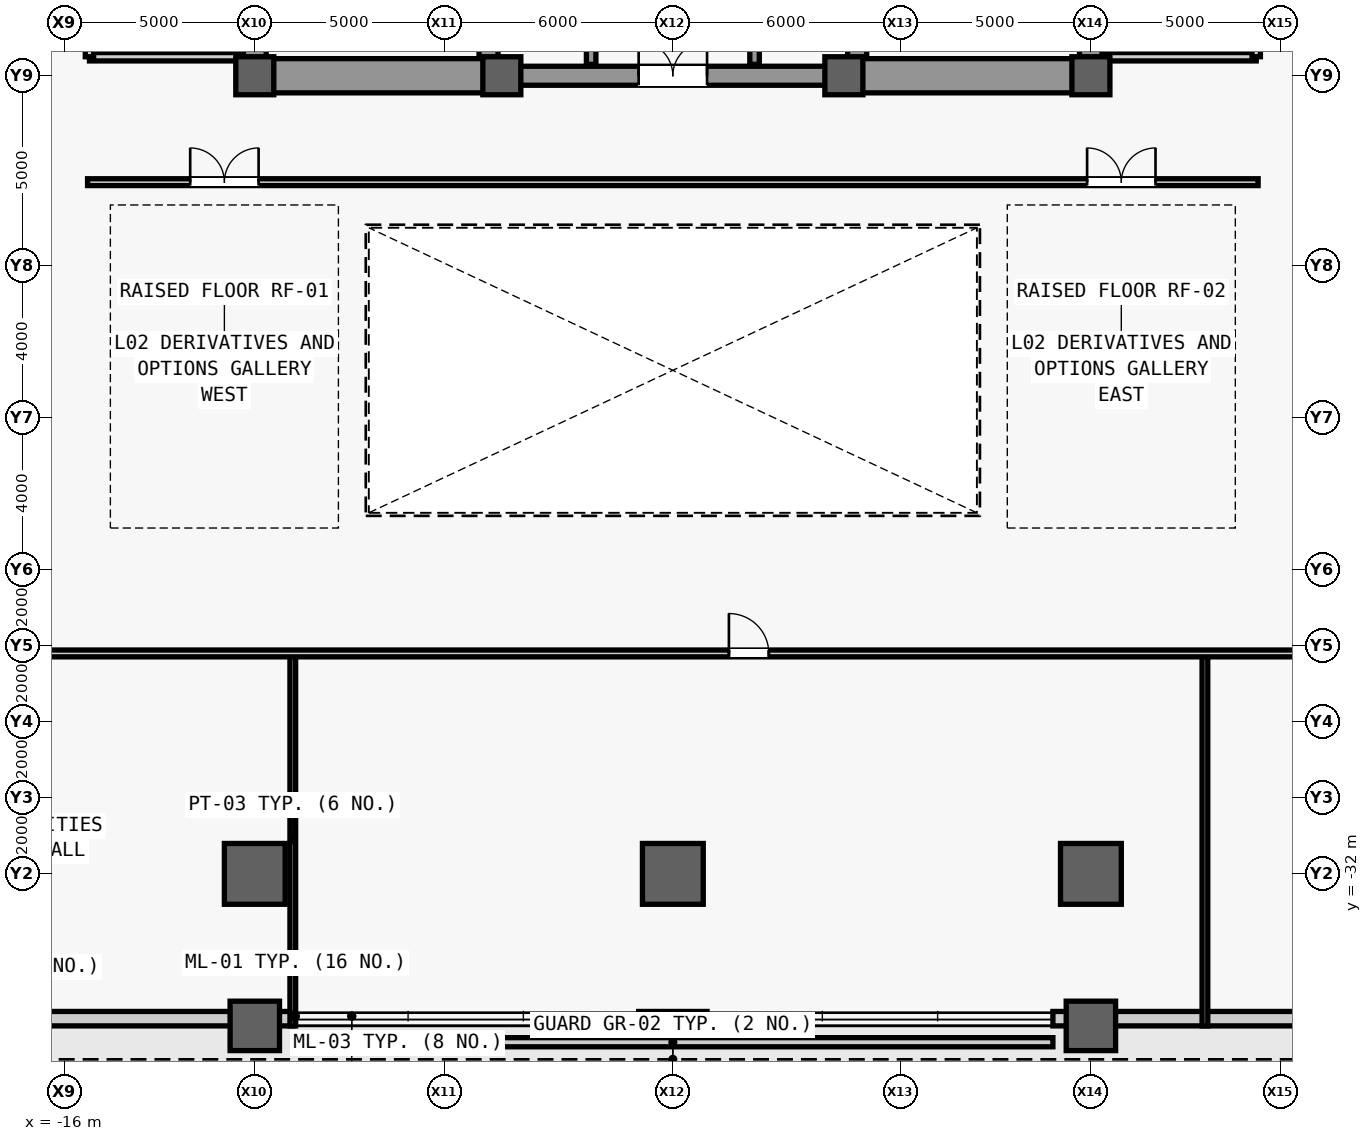
"""IFC4 building model, lengths in metres.
Left out: names, types, materials, properties, quantities, classifications, styles, units other than length and angle.
Written with IfcOpenShell. Run it as: python <this file> out.ifc"""

import sys

from ifc_helpers import new_model, si_unit, direction, frame, frame_2d, origin, origin_2d, place, context, subcontext, project, spatial, rectangle, extrude, source, transform, mapped, element, fill, save


model = new_model("IFC4")
c1 = context("Model", 3, precision=1e-05, world=origin(), true_north=direction((0.0, 1.0)))
c2 = subcontext(c1, "Body", "Model", "MODEL_VIEW")
j1 = project(units=[si_unit("LENGTHUNIT", "METRE"), si_unit("PLANEANGLEUNIT", "RADIAN")], contexts=[c1])
p1 = place(None, origin())
s1 = spatial("IfcSite", under=j1, at=p1, CompositionType="ELEMENT")
p2 = place(p1, origin())
s2 = spatial("IfcBuilding", under=s1, at=p2, CompositionType="ELEMENT")
p3 = place(p2, frame((0.0, 0.0, 12.0)))
s3 = spatial("IfcBuildingStorey", under=s2, at=p3, CompositionType="ELEMENT", Elevation=12.0)
m1 = source(origin(), c2, "Body", "SweptSolid", [
    extrude(rectangle(XDim=22.0, YDim=0.6, at=frame_2d((11.0, 0.0))), origin(), (0.0, 0.0, 1.0), 5.08),
])
p4 = place(p3, frame((-11.0, -11.0, 0.0), z_axis=(0.0, 0.0, 1.0), x_axis=(0.0, 1.0, 0.0)))
e1 = element("IfcWall", 1, at=p4, inside=s3, PredefinedType="SHEAR", context=c2, shape_type="MappedRepresentation", body=[
    mapped(m1, transform((0.0, 0.0, 0.0), scale=1.0)),
])
m2 = source(origin(), c2, "Body", "SweptSolid", [
    extrude(rectangle(XDim=1.1, YDim=2.2, at=frame_2d((0.55, 1.1))), frame((0.0, 0.31, 0.0), z_axis=(0.0, -1.0, 0.0), x_axis=(1.0, 0.0, 0.0)), (0.0, 0.0, 1.0), 0.62),
])
p5 = place(p4, frame((0.8, 0.0, 0.0)))
e2 = element("IfcOpeningElement", 2, at=p5, cuts=e1, PredefinedType="OPENING", context=c2, shape_type="MappedRepresentation", body=[
    mapped(m2, transform((0.0, 0.0, 0.0), scale=1.0)),
])
p6 = place(p4, frame((12.5, 0.0, 0.0)))
e3 = element("IfcOpeningElement", 3, at=p6, cuts=e1, PredefinedType="OPENING", context=c2, shape_type="MappedRepresentation", body=[
    mapped(m2, transform((0.0, 0.0, 0.0), scale=1.0)),
])
m3 = source(origin(), c2, "Body", "SweptSolid", [
    extrude(rectangle(XDim=0.9, YDim=2.15, at=frame_2d((0.45, 1.075))), frame((0.0, 0.31, 0.0), z_axis=(0.0, -1.0, 0.0), x_axis=(1.0, 0.0, 0.0)), (0.0, 0.0, 1.0), 0.62),
])
p7 = place(p4, frame((6.85, 0.0, 0.0)))
e4 = element("IfcOpeningElement", 4, at=p7, cuts=e1, PredefinedType="OPENING", context=c2, shape_type="MappedRepresentation", body=[
    mapped(m3, transform((0.0, 0.0, 0.0), scale=1.0)),
])
m4 = source(origin(), c2, "Body", "SweptSolid", [
    extrude(rectangle(XDim=1.3, YDim=2.3, at=frame_2d((0.65, 1.15))), frame((0.0, 0.31, 0.0), z_axis=(0.0, -1.0, 0.0), x_axis=(1.0, 0.0, 0.0)), (0.0, 0.0, 1.0), 0.62),
])
p8 = place(p4, frame((2.7, 0.0, 0.0)))
e5 = element("IfcOpeningElement", 5, at=p8, cuts=e1, PredefinedType="OPENING", context=c2, shape_type="MappedRepresentation", body=[
    mapped(m4, transform((0.0, 0.0, 0.0), scale=1.0)),
])
p9 = place(p3, frame((11.0, -11.0, 0.0), z_axis=(0.0, 0.0, 1.0), x_axis=(0.0, 1.0, 0.0)))
e6 = element("IfcWall", 6, at=p9, inside=s3, PredefinedType="SHEAR", context=c2, shape_type="MappedRepresentation", body=[
    mapped(m1, transform((0.0, 0.0, 0.0), scale=1.0)),
])
p10 = place(p9, frame((0.8, 0.0, 0.0)))
e7 = element("IfcOpeningElement", 7, at=p10, cuts=e6, PredefinedType="OPENING", context=c2, shape_type="MappedRepresentation", body=[
    mapped(m2, transform((0.0, 0.0, 0.0), scale=1.0)),
])
p11 = place(p9, frame((6.2, 0.0, 0.0)))
e8 = element("IfcOpeningElement", 8, at=p11, cuts=e6, PredefinedType="OPENING", context=c2, shape_type="MappedRepresentation", body=[
    mapped(m3, transform((0.0, 0.0, 0.0), scale=1.0)),
])
p12 = place(p9, frame((8.05, 0.0, 0.0)))
e9 = element("IfcOpeningElement", 9, at=p12, cuts=e6, PredefinedType="OPENING", context=c2, shape_type="MappedRepresentation", body=[
    mapped(m3, transform((0.0, 0.0, 0.0), scale=1.0)),
])
p13 = place(p9, frame((2.7, 0.0, 0.0)))
e10 = element("IfcOpeningElement", 10, at=p13, cuts=e6, PredefinedType="OPENING", context=c2, shape_type="MappedRepresentation", body=[
    mapped(m4, transform((0.0, 0.0, 0.0), scale=1.0)),
])
p14 = place(p9, frame((13.35, 0.0, 0.0)))
e11 = element("IfcOpeningElement", 11, at=p14, cuts=e6, PredefinedType="OPENING", context=c2, shape_type="MappedRepresentation", body=[
    mapped(m4, transform((0.0, 0.0, 0.0), scale=1.0)),
])
m5 = source(origin(), c2, "Body", "SweptSolid", [
    extrude(rectangle(XDim=21.4, YDim=0.5, at=frame_2d((10.7, 0.0))), origin(), (0.0, 0.0, 1.0), 5.08),
])
for number, where, z_axis, x_axis in (
    (12, (-4.85, -10.7, 0.0), (0.0, 0.0, 1.0), (0.0, 1.0, 0.0)),
    (13, (4.85, -10.7, 0.0), (0.0, 0.0, 1.0), (0.0, 1.0, 0.0)),
):
    element("IfcWall", number, at=place(p3, frame(where, z_axis=z_axis, x_axis=x_axis)), inside=s3, PredefinedType="SHEAR", context=c2, shape_type="MappedRepresentation", body=[
        mapped(m5, transform((0.0, 0.0, 0.0), scale=1.0)),
    ])
m6 = source(origin(), c2, "Body", "SweptSolid", [
    extrude(rectangle(XDim=5.85, YDim=0.9, at=frame_2d((2.925, 0.0))), origin(), (0.0, 0.0, 1.0), 5.08),
])
for number, where, z_axis, x_axis in (
    (14, (-10.7, -11.0, 0.0), (0.0, 0.0, 1.0), (1.0, 0.0, 0.0)),
    (15, (4.85, -11.0, 0.0), (0.0, 0.0, 1.0), (1.0, 0.0, 0.0)),
):
    element("IfcWall", number, at=place(p3, frame(where, z_axis=z_axis, x_axis=x_axis)), inside=s3, PredefinedType="SHEAR", context=c2, shape_type="MappedRepresentation", body=[
        mapped(m6, transform((0.0, 0.0, 0.0), scale=1.0)),
    ])
m7 = source(origin(), c2, "Body", "SweptSolid", [
    extrude(rectangle(XDim=9.2, YDim=0.5, at=frame_2d((4.6, 0.0))), origin(), (0.0, 0.0, 1.0), 5.08),
])
p15 = place(p3, frame((-4.6, -11.0, 0.0), z_axis=(0.0, 0.0, 1.0), x_axis=(1.0, 0.0, 0.0)))
e16 = element("IfcWall", 16, at=p15, inside=s3, PredefinedType="SHEAR", context=c2, shape_type="MappedRepresentation", body=[
    mapped(m7, transform((0.0, 0.0, 0.0), scale=1.0)),
])
m8 = source(origin(), c2, "Body", "SweptSolid", [
    extrude(rectangle(XDim=1.8, YDim=2.25, at=frame_2d((0.9, 1.125))), frame((0.0, 0.26, 0.0), z_axis=(0.0, -1.0, 0.0), x_axis=(1.0, 0.0, 0.0)), (0.0, 0.0, 1.0), 0.52),
])
p16 = place(p15, frame((3.7, 0.0, 0.0)))
e17 = element("IfcOpeningElement", 17, at=p16, cuts=e16, PredefinedType="OPENING", context=c2, shape_type="MappedRepresentation", body=[
    mapped(m8, transform((0.0, 0.0, 0.0), scale=1.0)),
])
m9 = source(origin(), c2, "Body", "SweptSolid", [
    extrude(rectangle(XDim=1.3, YDim=1.3, at=origin_2d()), origin(), (0.0, 0.0, 1.0), 5.4),
])
p17 = place(p3, frame((-11.0, -36.0, 0.0), z_axis=(0.0, 0.0, 1.0), x_axis=(1.0, 0.0, 0.0)))
e18 = element("IfcColumn", 18, at=p17, inside=s3, PredefinedType="COLUMN", context=c2, shape_type="MappedRepresentation", body=[
    mapped(m9, transform((0.0, 0.0, 0.0), scale=1.0)),
])
m10 = source(origin(), c2, "Body", "SweptSolid", [
    extrude(rectangle(XDim=1.6, YDim=1.6, at=origin_2d()), origin(), (0.0, 0.0, 1.0), 5.4),
])
p18 = place(p3, frame((-11.0, -32.0, 0.0), z_axis=(0.0, 0.0, 1.0), x_axis=(1.0, 0.0, 0.0)))
e19 = element("IfcColumn", 19, at=p18, inside=s3, PredefinedType="COLUMN", context=c2, shape_type="MappedRepresentation", body=[
    mapped(m10, transform((0.0, 0.0, 0.0), scale=1.0)),
])
m11 = source(origin(), c2, "Body", "SweptSolid", [
    extrude(rectangle(XDim=1.0, YDim=1.0, at=origin_2d()), origin(), (0.0, 0.0, 1.0), 5.4),
])
for number, where, z_axis, x_axis in (
    (20, (-11.0, -11.0, 0.0), (0.0, 0.0, 1.0), (1.0, 0.0, 0.0)),
    (21, (-4.5, -11.0, 0.0), (0.0, 0.0, 1.0), (1.0, 0.0, 0.0)),
):
    element("IfcColumn", number, at=place(p3, frame(where, z_axis=z_axis, x_axis=x_axis)), inside=s3, PredefinedType="COLUMN", context=c2, shape_type="MappedRepresentation", body=[
        mapped(m11, transform((0.0, 0.0, 0.0), scale=1.0)),
    ])
p19 = place(p3, frame((0.0, -32.0, 0.0), z_axis=(0.0, 0.0, 1.0), x_axis=(1.0, 0.0, 0.0)))
e22 = element("IfcColumn", 22, at=p19, inside=s3, PredefinedType="COLUMN", context=c2, shape_type="MappedRepresentation", body=[
    mapped(m10, transform((0.0, 0.0, 0.0), scale=1.0)),
])
p20 = place(p3, frame((4.5, -11.0, 0.0), z_axis=(0.0, 0.0, 1.0), x_axis=(1.0, 0.0, 0.0)))
e23 = element("IfcColumn", 23, at=p20, inside=s3, PredefinedType="COLUMN", context=c2, shape_type="MappedRepresentation", body=[
    mapped(m11, transform((0.0, 0.0, 0.0), scale=1.0)),
])
p21 = place(p3, frame((11.0, -36.0, 0.0), z_axis=(0.0, 0.0, 1.0), x_axis=(1.0, 0.0, 0.0)))
e24 = element("IfcColumn", 24, at=p21, inside=s3, PredefinedType="COLUMN", context=c2, shape_type="MappedRepresentation", body=[
    mapped(m9, transform((0.0, 0.0, 0.0), scale=1.0)),
])
p22 = place(p3, frame((11.0, -32.0, 0.0), z_axis=(0.0, 0.0, 1.0), x_axis=(1.0, 0.0, 0.0)))
e25 = element("IfcColumn", 25, at=p22, inside=s3, PredefinedType="COLUMN", context=c2, shape_type="MappedRepresentation", body=[
    mapped(m10, transform((0.0, 0.0, 0.0), scale=1.0)),
])
p23 = place(p3, frame((11.0, -11.0, 0.0), z_axis=(0.0, 0.0, 1.0), x_axis=(1.0, 0.0, 0.0)))
e26 = element("IfcColumn", 26, at=p23, inside=s3, PredefinedType="COLUMN", context=c2, shape_type="MappedRepresentation", body=[
    mapped(m11, transform((0.0, 0.0, 0.0), scale=1.0)),
])
m12 = source(origin(), c2, "Body", "SweptSolid", [
    extrude(rectangle(XDim=32.0, YDim=0.38, at=frame_2d((16.0, 0.0))), origin(), (0.0, 0.0, 1.0), 3.28),
])
p24 = place(p3, frame((-42.0, -35.81, 0.0), z_axis=(0.0, 0.0, 1.0), x_axis=(1.0, 0.0, 0.0)))
e27 = element("IfcWall", 27, at=p24, inside=s3, PredefinedType="STANDARD", context=c2, shape_type="MappedRepresentation", body=[
    mapped(m12, transform((0.0, 0.0, 0.0), scale=1.0)),
])
m13 = source(origin(), c2, "Body", "SweptSolid", [
    extrude(rectangle(XDim=1.6, YDim=2.25, at=frame_2d((0.8, 1.125))), frame((0.0, 0.2, 0.0), z_axis=(0.0, -1.0, 0.0), x_axis=(1.0, 0.0, 0.0)), (0.0, 0.0, 1.0), 0.4),
])
p25 = place(p24, frame((14.2, 0.0, 0.0)))
e28 = element("IfcOpeningElement", 28, at=p25, cuts=e27, PredefinedType="OPENING", context=c2, shape_type="MappedRepresentation", body=[
    mapped(m13, transform((0.0, 0.0, 0.0), scale=1.0)),
])
m14 = source(origin(), c2, "Body", "SweptSolid", [
    extrude(rectangle(XDim=2.4, YDim=2.56, at=frame_2d((1.2, 1.28))), frame((0.0, 0.2, 0.0), z_axis=(0.0, -1.0, 0.0), x_axis=(1.0, 0.0, 0.0)), (0.0, 0.0, 1.0), 0.4),
])
p26 = place(p24, frame((22.8, 0.0, 0.5)))
e29 = element("IfcOpeningElement", 29, at=p26, cuts=e27, PredefinedType="OPENING", context=c2, shape_type="MappedRepresentation", body=[
    mapped(m14, transform((0.0, 0.0, 0.0), scale=1.0)),
])
m15 = source(origin(), c2, "Body", "SweptSolid", [
    extrude(rectangle(XDim=1.8, YDim=0.38, at=frame_2d((0.9, 0.0))), origin(), (0.0, 0.0, 1.0), 3.28),
])
p27 = place(p3, frame((-0.9, -35.81, 0.0), z_axis=(0.0, 0.0, 1.0), x_axis=(1.0, 0.0, 0.0)))
e30 = element("IfcWall", 30, at=p27, inside=s3, PredefinedType="STANDARD", context=c2, shape_type="MappedRepresentation", body=[
    mapped(m15, transform((0.0, 0.0, 0.0), scale=1.0)),
])
p28 = place(p3, frame((10.0, -35.81, 0.0), z_axis=(0.0, 0.0, 1.0), x_axis=(1.0, 0.0, 0.0)))
e31 = element("IfcWall", 31, at=p28, inside=s3, PredefinedType="STANDARD", context=c2, shape_type="MappedRepresentation", body=[
    mapped(m12, transform((0.0, 0.0, 0.0), scale=1.0)),
])
p29 = place(p28, frame((6.8, 0.0, 0.5)))
e32 = element("IfcOpeningElement", 32, at=p29, cuts=e31, PredefinedType="OPENING", context=c2, shape_type="MappedRepresentation", body=[
    mapped(m14, transform((0.0, 0.0, 0.0), scale=1.0)),
])
p30 = place(p28, frame((14.8, 0.0, 0.5)))
e33 = element("IfcOpeningElement", 33, at=p30, cuts=e31, PredefinedType="OPENING", context=c2, shape_type="MappedRepresentation", body=[
    mapped(m14, transform((0.0, 0.0, 0.0), scale=1.0)),
])
m16 = source(origin(), c2, "Body", "SweptSolid", [
    extrude(rectangle(XDim=20.0, YDim=0.24, at=frame_2d((10.0, 0.0))), origin(), (0.0, 0.0, 1.0), 0.65),
])
p31 = place(p3, frame((-10.0, -36.43, 0.0), z_axis=(0.0, 0.0, 1.0), x_axis=(1.0, 0.0, 0.0)))
e34 = element("IfcWall", 34, at=p31, inside=s3, PredefinedType="STANDARD", context=c2, shape_type="MappedRepresentation", body=[
    mapped(m16, transform((0.0, 0.0, 0.0), scale=1.0)),
])
m17 = source(origin(), c2, "Body", "SweptSolid", [
    extrude(rectangle(XDim=4.05, YDim=0.22, at=frame_2d((2.025, 0.0))), origin(), (0.0, 0.0, 1.0), 5.08),
])
p32 = place(p3, frame((-15.35, -10.5, 0.0), z_axis=(0.0, 0.0, 1.0), x_axis=(1.0, 0.0, 0.0)))
e35 = element("IfcWall", 35, at=p32, inside=s3, PredefinedType="PARTITIONING", context=c2, shape_type="MappedRepresentation", body=[
    mapped(m17, transform((0.0, 0.0, 0.0), scale=1.0)),
])
m18 = source(origin(), c2, "Body", "SweptSolid", [
    extrude(rectangle(XDim=4.4, YDim=0.22, at=frame_2d((2.2, 0.0))), origin(), (0.0, 0.0, 1.0), 5.08),
])
p33 = place(p3, frame((-15.35, -10.5, 0.0), z_axis=(0.0, 0.0, 1.0), x_axis=(0.0, 1.0, 0.0)))
e36 = element("IfcWall", 36, at=p33, inside=s3, PredefinedType="PARTITIONING", context=c2, shape_type="MappedRepresentation", body=[
    mapped(m18, transform((0.0, 0.0, 0.0), scale=1.0)),
])
m19 = source(origin(), c2, "Body", "SweptSolid", [
    extrude(rectangle(XDim=1.2, YDim=2.2, at=frame_2d((0.6, 1.1))), frame((0.0, 0.12, 0.0), z_axis=(0.0, -1.0, 0.0), x_axis=(1.0, 0.0, 0.0)), (0.0, 0.0, 1.0), 0.24),
])
p34 = place(p33, frame((1.6, 0.0, 0.0)))
e37 = element("IfcOpeningElement", 37, at=p34, cuts=e36, PredefinedType="OPENING", context=c2, shape_type="MappedRepresentation", body=[
    mapped(m19, transform((0.0, 0.0, 0.0), scale=1.0)),
])
p35 = place(p3, frame((11.3, -10.5, 0.0), z_axis=(0.0, 0.0, 1.0), x_axis=(1.0, 0.0, 0.0)))
e38 = element("IfcWall", 38, at=p35, inside=s3, PredefinedType="PARTITIONING", context=c2, shape_type="MappedRepresentation", body=[
    mapped(m17, transform((0.0, 0.0, 0.0), scale=1.0)),
])
p36 = place(p3, frame((15.35, -10.5, 0.0), z_axis=(0.0, 0.0, 1.0), x_axis=(0.0, 1.0, 0.0)))
e39 = element("IfcWall", 39, at=p36, inside=s3, PredefinedType="PARTITIONING", context=c2, shape_type="MappedRepresentation", body=[
    mapped(m18, transform((0.0, 0.0, 0.0), scale=1.0)),
])
p37 = place(p36, frame((1.6, 0.0, 0.0)))
e40 = element("IfcOpeningElement", 40, at=p37, cuts=e39, PredefinedType="OPENING", context=c2, shape_type="MappedRepresentation", body=[
    mapped(m19, transform((0.0, 0.0, 0.0), scale=1.0)),
])
m20 = source(origin(), c2, "Body", "SweptSolid", [
    extrude(rectangle(XDim=5.4, YDim=0.25, at=frame_2d((2.7, 0.0))), origin(), (0.0, 0.0, 1.0), 5.08),
])
p38 = place(p3, frame((-2.15, -10.7, 0.0), z_axis=(0.0, 0.0, 1.0), x_axis=(0.0, 1.0, 0.0)))
e41 = element("IfcWall", 41, at=p38, inside=s3, PredefinedType="SHEAR", context=c2, shape_type="MappedRepresentation", body=[
    mapped(m20, transform((0.0, 0.0, 0.0), scale=1.0)),
])
m21 = source(origin(), c2, "Body", "SweptSolid", [
    extrude(rectangle(XDim=1.2, YDim=2.3, at=frame_2d((0.6, 1.15))), frame((0.0, 0.135, 0.0), z_axis=(0.0, -1.0, 0.0), x_axis=(1.0, 0.0, 0.0)), (0.0, 0.0, 1.0), 0.27),
])
p39 = place(p38, frame((0.9, 0.0, 0.0)))
e42 = element("IfcOpeningElement", 42, at=p39, cuts=e41, PredefinedType="OPENING", context=c2, shape_type="MappedRepresentation", body=[
    mapped(m21, transform((0.0, 0.0, 0.0), scale=1.0)),
])
p40 = place(p38, frame((3.2, 0.0, 0.0)))
e43 = element("IfcOpeningElement", 43, at=p40, cuts=e41, PredefinedType="OPENING", context=c2, shape_type="MappedRepresentation", body=[
    mapped(m21, transform((0.0, 0.0, 0.0), scale=1.0)),
])
p41 = place(p3, frame((2.15, -10.7, 0.0), z_axis=(0.0, 0.0, 1.0), x_axis=(0.0, 1.0, 0.0)))
e44 = element("IfcWall", 44, at=p41, inside=s3, PredefinedType="SHEAR", context=c2, shape_type="MappedRepresentation", body=[
    mapped(m20, transform((0.0, 0.0, 0.0), scale=1.0)),
])
p42 = place(p41, frame((0.9, 0.0, 0.0)))
e45 = element("IfcOpeningElement", 45, at=p42, cuts=e44, PredefinedType="OPENING", context=c2, shape_type="MappedRepresentation", body=[
    mapped(m21, transform((0.0, 0.0, 0.0), scale=1.0)),
])
p43 = place(p41, frame((3.2, 0.0, 0.0)))
e46 = element("IfcOpeningElement", 46, at=p43, cuts=e44, PredefinedType="OPENING", context=c2, shape_type="MappedRepresentation", body=[
    mapped(m21, transform((0.0, 0.0, 0.0), scale=1.0)),
])
m22 = source(origin(), c2, "Body", "SweptSolid", [
    extrude(rectangle(XDim=30.8, YDim=0.18, at=frame_2d((15.4, 0.0))), origin(), (0.0, 0.0, 1.0), 5.08),
])
p44 = place(p3, frame((-15.4, -13.8, 0.0), z_axis=(0.0, 0.0, 1.0), x_axis=(1.0, 0.0, 0.0)))
e47 = element("IfcWall", 47, at=p44, inside=s3, PredefinedType="PARTITIONING", context=c2, shape_type="MappedRepresentation", body=[
    mapped(m22, transform((0.0, 0.0, 0.0), scale=1.0)),
])
m23 = source(origin(), c2, "Body", "SweptSolid", [
    extrude(rectangle(XDim=1.8, YDim=2.25, at=frame_2d((0.9, 1.125))), frame((0.0, 0.1, 0.0), z_axis=(0.0, -1.0, 0.0), x_axis=(1.0, 0.0, 0.0)), (0.0, 0.0, 1.0), 0.2),
])
p45 = place(p44, frame((2.7, 0.0, 0.0)))
e48 = element("IfcOpeningElement", 48, at=p45, cuts=e47, PredefinedType="OPENING", context=c2, shape_type="MappedRepresentation", body=[
    mapped(m23, transform((0.0, 0.0, 0.0), scale=1.0)),
])
p46 = place(p44, frame((26.3, 0.0, 0.0)))
e49 = element("IfcOpeningElement", 49, at=p46, cuts=e47, PredefinedType="OPENING", context=c2, shape_type="MappedRepresentation", body=[
    mapped(m23, transform((0.0, 0.0, 0.0), scale=1.0)),
])
m24 = source(origin(), c2, "Body", "SweptSolid", [
    extrude(rectangle(XDim=9.8, YDim=0.15, at=frame_2d((4.9, 0.0))), origin(), (0.0, 0.0, 1.0), 5.08),
])
for number, where, z_axis, x_axis in (
    (50, (-10.0, -36.0, 0.0), (0.0, 0.0, 1.0), (0.0, 1.0, 0.0)),
    (51, (14.0, -36.0, 0.0), (0.0, 0.0, 1.0), (0.0, 1.0, 0.0)),
):
    element("IfcWall", number, at=place(p3, frame(where, z_axis=z_axis, x_axis=x_axis)), inside=s3, PredefinedType="PARTITIONING", context=c2, shape_type="MappedRepresentation", body=[
        mapped(m24, transform((0.0, 0.0, 0.0), scale=1.0)),
    ])
m25 = source(origin(), c2, "Body", "SweptSolid", [
    extrude(rectangle(XDim=84.0, YDim=0.18, at=frame_2d((42.0, 0.0))), origin(), (0.0, 0.0, 1.0), 5.08),
])
p47 = place(p3, frame((-42.0, -26.2, 0.0), z_axis=(0.0, 0.0, 1.0), x_axis=(1.0, 0.0, 0.0)))
e52 = element("IfcWall", 52, at=p47, inside=s3, PredefinedType="PARTITIONING", context=c2, shape_type="MappedRepresentation", body=[
    mapped(m25, transform((0.0, 0.0, 0.0), scale=1.0)),
])
m26 = source(origin(), c2, "Body", "SweptSolid", [
    extrude(rectangle(XDim=1.05, YDim=2.2, at=frame_2d((0.525, 1.1))), frame((0.0, 0.1, 0.0), z_axis=(0.0, -1.0, 0.0), x_axis=(1.0, 0.0, 0.0)), (0.0, 0.0, 1.0), 0.2),
])
p48 = place(p47, frame((21.725, 0.0, 0.0)))
e53 = element("IfcOpeningElement", 53, at=p48, cuts=e52, PredefinedType="OPENING", context=c2, shape_type="MappedRepresentation", body=[
    mapped(m26, transform((0.0, 0.0, 0.0), scale=1.0)),
])
p49 = place(p47, frame((43.475, 0.0, 0.0)))
e54 = element("IfcOpeningElement", 54, at=p49, cuts=e52, PredefinedType="OPENING", context=c2, shape_type="MappedRepresentation", body=[
    mapped(m26, transform((0.0, 0.0, 0.0), scale=1.0)),
])
p50 = place(p47, frame((63.225, 0.0, 0.0)))
e55 = element("IfcOpeningElement", 55, at=p50, cuts=e52, PredefinedType="OPENING", context=c2, shape_type="MappedRepresentation", body=[
    mapped(m26, transform((0.0, 0.0, 0.0), scale=1.0)),
])
m27 = source(origin(), c2, "Body", "SweptSolid", [
    extrude(rectangle(XDim=1.8, YDim=2.25, at=frame_2d((0.9, 1.125))), frame((0.0, 0.025, 0.0), z_axis=(0.0, -1.0, 0.0), x_axis=(1.0, 0.0, 0.0)), (0.0, 0.0, 1.0), 0.05),
])
p51 = place(p16, origin())
e56 = element("IfcDoor", 56, at=p51, inside=s3, OperationType="SINGLE_SWING_LEFT", PredefinedType="DOOR", context=c2, shape_type="MappedRepresentation", body=[
    mapped(m27, transform((0.0, 0.0, 0.0), scale=1.0)),
])
fill(e17, e56)
p52 = place(p45, origin())
e57 = element("IfcDoor", 57, at=p52, inside=s3, OperationType="SINGLE_SWING_LEFT", PredefinedType="DOOR", context=c2, shape_type="MappedRepresentation", body=[
    mapped(m27, transform((0.0, 0.0, 0.0), scale=1.0)),
])
fill(e48, e57)
p53 = place(p46, origin())
e58 = element("IfcDoor", 58, at=p53, inside=s3, OperationType="SINGLE_SWING_RIGHT", PredefinedType="DOOR", context=c2, shape_type="MappedRepresentation", body=[
    mapped(m27, transform((0.0, 0.0, 0.0), scale=1.0)),
])
fill(e49, e58)
m28 = source(origin(), c2, "Body", "SweptSolid", [
    extrude(rectangle(XDim=1.05, YDim=2.2, at=frame_2d((0.525, 1.1))), frame((0.0, 0.025, 0.0), z_axis=(0.0, -1.0, 0.0), x_axis=(1.0, 0.0, 0.0)), (0.0, 0.0, 1.0), 0.05),
])
p54 = place(p49, origin())
e59 = element("IfcDoor", 59, at=p54, inside=s3, OperationType="SINGLE_SWING_LEFT", PredefinedType="DOOR", context=c2, shape_type="MappedRepresentation", body=[
    mapped(m28, transform((0.0, 0.0, 0.0), scale=1.0)),
])
fill(e54, e59)
save(model, sys.argv[1])
